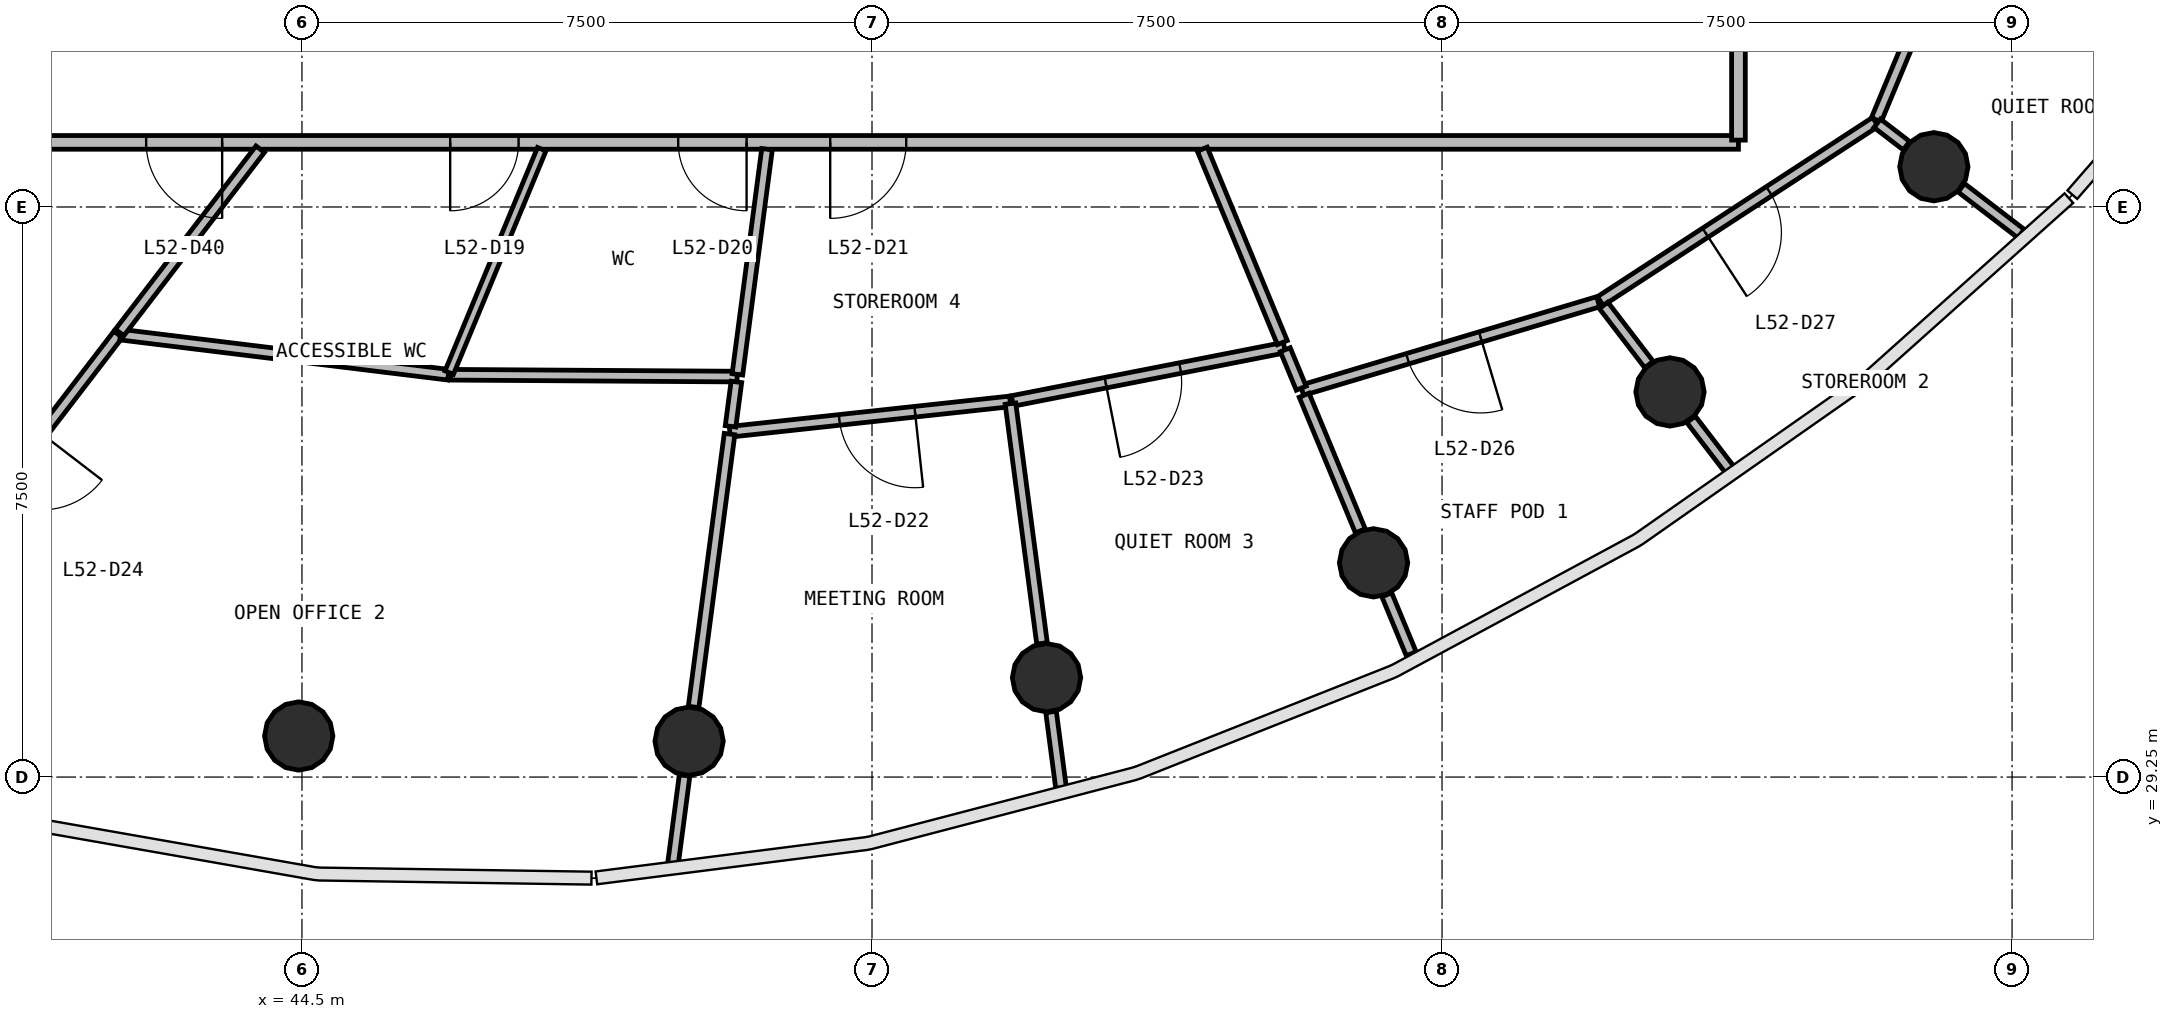
"""IFC4 building model, lengths in metres.
Left out: names, types, materials, properties, quantities, classifications, styles, units other than length and angle.
Written with IfcOpenShell. Run it as: python <this file> out.ifc"""

import sys

from ifc_helpers import new_model, si_unit, direction, frame, frame_2d, origin, origin_2d, place, context, subcontext, project, spatial, rectangle, circle, extrude, source, transform, mapped, element, fill, save


model = new_model("IFC4")
c1 = context("Model", 3, precision=1e-05, world=origin(), true_north=direction((0.0, 1.0)))
c2 = subcontext(c1, "Body", "Model", "MODEL_VIEW")
j1 = project(units=[si_unit("LENGTHUNIT", "METRE"), si_unit("PLANEANGLEUNIT", "RADIAN")], contexts=[c1])
p1 = place(None, origin())
s1 = spatial("IfcSite", under=j1, at=p1, CompositionType="ELEMENT")
p2 = place(p1, origin())
s2 = spatial("IfcBuilding", under=s1, at=p2, CompositionType="ELEMENT")
p3 = place(p2, frame((0.0, 0.0, 215.0)))
s3 = spatial("IfcBuildingStorey", under=s2, at=p3, CompositionType="ELEMENT", Elevation=215.0)
m1 = source(origin(), c2, "Body", "SweptSolid", [
    extrude(circle(Radius=0.45, at=origin_2d()), origin(), (0.0, 0.0, 1.0), 3.9),
])
for number, where, z_axis, x_axis in (
    (1, (44.457, 29.79, 0.0), (0.0, 0.0, 1.0), (1.0, 0.0, 0.0)),
    (2, (49.594, 29.722, 0.0), (0.0, 0.0, 1.0), (1.0, 0.0, 0.0)),
    (3, (54.296, 30.558, 0.0), (0.0, 0.0, 1.0), (1.0, 0.0, 0.0)),
    (4, (58.599, 32.069, 0.0), (0.0, 0.0, 1.0), (1.0, 0.0, 0.0)),
    (5, (62.499, 34.317, 0.0), (0.0, 0.0, 1.0), (1.0, 0.0, 0.0)),
    (6, (65.971, 37.28, 0.0), (0.0, 0.0, 1.0), (1.0, 0.0, 0.0)),
):
    element("IfcColumn", number, at=place(p3, frame(where, z_axis=z_axis, x_axis=x_axis)), inside=s3, PredefinedType="COLUMN", context=c2, shape_type="MappedRepresentation", body=[
        mapped(m1, transform((0.0, 0.0, 0.0), scale=1.0)),
    ])
p4 = place(p3, frame((63.4, 37.6, 0.0), z_axis=(0.0, 0.0, 1.0), x_axis=(-1.0, 0.0, 0.0)))
e7 = element("IfcWall", 7, at=p4, inside=s3, PredefinedType="PARTITIONING", context=c2, shape_type="SweptSolid", body=[
    extrude(rectangle(XDim=22.8, YDim=0.18, at=frame_2d((11.4, 0.0))), origin(), (0.0, 0.0, 1.0), 2.88),
])
p5 = place(p4, frame((16.05, 0.0, 0.0)))
e8 = element("IfcOpeningElement", 8, at=p5, cuts=e7, PredefinedType="OPENING", context=c2, shape_type="SweptSolid", body=[
    extrude(rectangle(XDim=0.9, YDim=2.1, at=frame_2d((0.45, 1.05))), frame((0.0, 0.1, 0.0), z_axis=(0.0, -1.0, 0.0), x_axis=(1.0, 0.0, 0.0)), (0.0, 0.0, 1.0), 0.2),
])
p6 = place(p4, frame((13.05, 0.0, 0.0)))
e9 = element("IfcOpeningElement", 9, at=p6, cuts=e7, PredefinedType="OPENING", context=c2, shape_type="SweptSolid", body=[
    extrude(rectangle(XDim=0.9, YDim=2.1, at=frame_2d((0.45, 1.05))), frame((0.0, 0.1, 0.0), z_axis=(0.0, -1.0, 0.0), x_axis=(1.0, 0.0, 0.0)), (0.0, 0.0, 1.0), 0.2),
])
p7 = place(p4, frame((10.95, 0.0, 0.0)))
e10 = element("IfcOpeningElement", 10, at=p7, cuts=e7, PredefinedType="OPENING", context=c2, shape_type="SweptSolid", body=[
    extrude(rectangle(XDim=1.0, YDim=2.1, at=frame_2d((0.5, 1.05))), frame((0.0, 0.1, 0.0), z_axis=(0.0, -1.0, 0.0), x_axis=(1.0, 0.0, 0.0)), (0.0, 0.0, 1.0), 0.2),
])
p8 = place(p4, frame((19.95, 0.0, 0.0)))
e11 = element("IfcOpeningElement", 11, at=p8, cuts=e7, PredefinedType="OPENING", context=c2, shape_type="SweptSolid", body=[
    extrude(rectangle(XDim=1.0, YDim=2.1, at=frame_2d((0.5, 1.05))), frame((0.0, 0.1, 0.0), z_axis=(0.0, -1.0, 0.0), x_axis=(1.0, 0.0, 0.0)), (0.0, 0.0, 1.0), 0.2),
])
p9 = place(p3, frame((63.4, 58.37, 0.0), z_axis=(0.0, 0.0, 1.0), x_axis=(0.0, -1.0, 0.0)))
e12 = element("IfcWall", 12, at=p9, inside=s3, PredefinedType="PARTITIONING", context=c2, shape_type="SweptSolid", body=[
    extrude(rectangle(XDim=20.74, YDim=0.18, at=frame_2d((10.37, 0.0))), origin(), (0.0, 0.0, 1.0), 2.88),
])
p10 = place(p9, frame((12.09, 0.0, 0.0)))
e13 = element("IfcOpeningElement", 13, at=p10, cuts=e12, PredefinedType="OPENING", context=c2, shape_type="SweptSolid", body=[
    extrude(rectangle(XDim=1.0, YDim=2.1, at=frame_2d((0.5, 1.05))), frame((0.0, 0.1, 0.0), z_axis=(0.0, -1.0, 0.0), x_axis=(1.0, 0.0, 0.0)), (0.0, 0.0, 1.0), 0.2),
])
p11 = place(p9, frame((9.89, 0.0, 0.0)))
e14 = element("IfcOpeningElement", 14, at=p11, cuts=e12, PredefinedType="OPENING", context=c2, shape_type="SweptSolid", body=[
    extrude(rectangle(XDim=1.0, YDim=2.1, at=frame_2d((0.5, 1.05))), frame((0.0, 0.1, 0.0), z_axis=(0.0, -1.0, 0.0), x_axis=(1.0, 0.0, 0.0)), (0.0, 0.0, 1.0), 0.2),
])
p12 = place(p9, frame((4.29, 0.0, 0.0)))
e15 = element("IfcOpeningElement", 15, at=p12, cuts=e12, PredefinedType="OPENING", context=c2, shape_type="SweptSolid", body=[
    extrude(rectangle(XDim=1.0, YDim=2.1, at=frame_2d((0.5, 1.05))), frame((0.0, 0.1, 0.0), z_axis=(0.0, -1.0, 0.0), x_axis=(1.0, 0.0, 0.0)), (0.0, 0.0, 1.0), 0.2),
])
p13 = place(p3, frame((42.082, 35.074, 0.0), z_axis=(0.0, 0.0, 1.0), x_axis=(-0.608752257704, -0.793360377596, 0.0)))
e16 = element("IfcWall", 16, at=p13, inside=s3, PredefinedType="PARTITIONING", context=c2, shape_type="SweptSolid", body=[
    extrude(rectangle(XDim=4.458, YDim=0.14, at=frame_2d((2.229, 0.0))), origin(), (0.0, 0.0, 1.0), 2.88),
])
p14 = place(p13, frame((1.65, 0.0, 0.0)))
e17 = element("IfcOpeningElement", 17, at=p14, cuts=e16, PredefinedType="OPENING", context=c2, shape_type="SweptSolid", body=[
    extrude(rectangle(XDim=1.0, YDim=2.1, at=frame_2d((0.5, 1.05))), frame((0.0, 0.08, 0.0), z_axis=(0.0, -1.0, 0.0), x_axis=(1.0, 0.0, 0.0)), (0.0, 0.0, 1.0), 0.16),
])
p15 = place(p3, frame((42.112, 35.071, 0.0), z_axis=(0.0, 0.0, 1.0), x_axis=(0.992606150854, -0.121379690584, 0.0)))
e18 = element("IfcWall", 18, at=p15, inside=s3, PredefinedType="PARTITIONING", context=c2, shape_type="SweptSolid", body=[
    extrude(rectangle(XDim=4.347, YDim=0.14, at=frame_2d((2.173, 0.0))), origin(), (0.0, 0.0, 1.0), 2.88),
])
p16 = place(p3, frame((65.202, 37.87, 0.0), z_axis=(0.0, 0.0, 1.0), x_axis=(-0.837855616801, -0.545891899001, 0.0)))
e19 = element("IfcWall", 19, at=p16, inside=s3, PredefinedType="PARTITIONING", context=c2, shape_type="SweptSolid", body=[
    extrude(rectangle(XDim=4.32, YDim=0.14, at=frame_2d((2.16, 0.0))), origin(), (0.0, 0.0, 1.0), 2.88),
])
p17 = place(p16, frame((1.67, 0.0, 0.0)))
e20 = element("IfcOpeningElement", 20, at=p17, cuts=e19, PredefinedType="OPENING", context=c2, shape_type="SweptSolid", body=[
    extrude(rectangle(XDim=1.0, YDim=2.1, at=frame_2d((0.5, 1.05))), frame((0.0, 0.08, 0.0), z_axis=(0.0, -1.0, 0.0), x_axis=(1.0, 0.0, 0.0)), (0.0, 0.0, 1.0), 0.16),
])
p18 = place(p3, frame((66.858, 41.845, 0.0), z_axis=(0.0, 0.0, 1.0), x_axis=(-0.384501893961, -0.923124202662, 0.0)))
e21 = element("IfcWall", 21, at=p18, inside=s3, PredefinedType="PARTITIONING", context=c2, shape_type="SweptSolid", body=[
    extrude(rectangle(XDim=4.277, YDim=0.14, at=frame_2d((2.139, 0.0))), origin(), (0.0, 0.0, 1.0), 2.88),
])
p19 = place(p18, frame((1.627, 0.0, 0.0)))
e22 = element("IfcOpeningElement", 22, at=p19, cuts=e21, PredefinedType="OPENING", context=c2, shape_type="SweptSolid", body=[
    extrude(rectangle(XDim=1.0, YDim=2.1, at=frame_2d((0.5, 1.05))), frame((0.0, 0.08, 0.0), z_axis=(0.0, -1.0, 0.0), x_axis=(1.0, 0.0, 0.0)), (0.0, 0.0, 1.0), 0.16),
])
p20 = place(p3, frame((61.554, 35.503, 0.0), z_axis=(0.0, 0.0, 1.0), x_axis=(-0.958115036861, -0.286383617097, 0.0)))
e23 = element("IfcWall", 23, at=p20, inside=s3, PredefinedType="PARTITIONING", context=c2, shape_type="SweptSolid", body=[
    extrude(rectangle(XDim=4.065, YDim=0.14, at=frame_2d((2.033, 0.0))), origin(), (0.0, 0.0, 1.0), 2.88),
])
p21 = place(p20, frame((1.615, 0.0, 0.0)))
e24 = element("IfcOpeningElement", 24, at=p21, cuts=e23, PredefinedType="OPENING", context=c2, shape_type="SweptSolid", body=[
    extrude(rectangle(XDim=1.0, YDim=2.1, at=frame_2d((0.5, 1.05))), frame((0.0, 0.08, 0.0), z_axis=(0.0, -1.0, 0.0), x_axis=(1.0, 0.0, 0.0)), (0.0, 0.0, 1.0), 0.16),
])
p22 = place(p3, frame((46.456, 34.543, 0.0), z_axis=(0.0, 0.0, 1.0), x_axis=(0.999979441631, -0.006412200578, 0.0)))
e25 = element("IfcWall", 25, at=p22, inside=s3, PredefinedType="PARTITIONING", context=c2, shape_type="SweptSolid", body=[
    extrude(rectangle(XDim=3.769, YDim=0.14, at=frame_2d((1.885, 0.0))), origin(), (0.0, 0.0, 1.0), 2.88),
])
p23 = place(p3, frame((53.818, 34.192, 0.0), z_axis=(0.0, 0.0, 1.0), x_axis=(-0.994173931983, -0.107787721776, 0.0)))
e26 = element("IfcWall", 26, at=p23, inside=s3, PredefinedType="PARTITIONING", context=c2, shape_type="SweptSolid", body=[
    extrude(rectangle(XDim=3.71, YDim=0.14, at=frame_2d((1.855, 0.0))), origin(), (0.0, 0.0, 1.0), 2.88),
])
p24 = place(p23, frame((1.26, 0.0, 0.0)))
e27 = element("IfcOpeningElement", 27, at=p24, cuts=e26, PredefinedType="OPENING", context=c2, shape_type="SweptSolid", body=[
    extrude(rectangle(XDim=1.0, YDim=2.1, at=frame_2d((0.5, 1.05))), frame((0.0, 0.08, 0.0), z_axis=(0.0, -1.0, 0.0), x_axis=(1.0, 0.0, 0.0)), (0.0, 0.0, 1.0), 0.16),
])
p25 = place(p3, frame((57.426, 34.9, 0.0), z_axis=(0.0, 0.0, 1.0), x_axis=(-0.981307553522, -0.192446058416, 0.0)))
e28 = element("IfcWall", 28, at=p25, inside=s3, PredefinedType="PARTITIONING", context=c2, shape_type="SweptSolid", body=[
    extrude(rectangle(XDim=3.647, YDim=0.14, at=frame_2d((1.824, 0.0))), origin(), (0.0, 0.0, 1.0), 2.88),
])
p26 = place(p25, frame((1.397, 0.0, 0.0)))
e29 = element("IfcOpeningElement", 29, at=p26, cuts=e28, PredefinedType="OPENING", context=c2, shape_type="SweptSolid", body=[
    extrude(rectangle(XDim=1.0, YDim=2.1, at=frame_2d((0.5, 1.05))), frame((0.0, 0.08, 0.0), z_axis=(0.0, -1.0, 0.0), x_axis=(1.0, 0.0, 0.0)), (0.0, 0.0, 1.0), 0.16),
])
p27 = place(p3, frame((50.125, 33.763, 0.0), z_axis=(0.0, 0.0, 1.0), x_axis=(-0.130520782699, -0.991445573536, 0.0)))
e30 = element("IfcWall", 30, at=p27, inside=s3, PredefinedType="PARTITIONING", context=c2, shape_type="SweptSolid", body=[
    extrude(rectangle(XDim=3.621, YDim=0.14, at=frame_2d((1.811, 0.0))), origin(), (0.0, 0.0, 1.0), 2.88),
])
p28 = place(p3, frame((53.822, 34.163, 0.0), z_axis=(0.0, 0.0, 1.0), x_axis=(0.130520013378, -0.991445674814, 0.0)))
e31 = element("IfcWall", 31, at=p28, inside=s3, PredefinedType="PARTITIONING", context=c2, shape_type="SweptSolid", body=[
    extrude(rectangle(XDim=3.182, YDim=0.14, at=frame_2d((1.591, 0.0))), origin(), (0.0, 0.0, 1.0), 2.88),
])
p29 = place(p3, frame((43.951, 37.51, 0.0), z_axis=(0.0, 0.0, 1.0), x_axis=(-0.608716498744, -0.793387814475, 0.0)))
e32 = element("IfcWall", 32, at=p29, inside=s3, PredefinedType="PARTITIONING", context=c2, shape_type="SweptSolid", body=[
    extrude(rectangle(XDim=3.039, YDim=0.14, at=frame_2d((1.52, 0.0))), origin(), (0.0, 0.0, 1.0), 2.88),
])
p30 = place(p3, frame((50.619, 37.51, 0.0), z_axis=(0.0, 0.0, 1.0), x_axis=(-0.130520050683, -0.991445669903, 0.0)))
e33 = element("IfcWall", 33, at=p30, inside=s3, PredefinedType="PARTITIONING", context=c2, shape_type="SweptSolid", body=[
    extrude(rectangle(XDim=2.987, YDim=0.14, at=frame_2d((1.494, 0.0))), origin(), (0.0, 0.0, 1.0), 2.88),
])
p31 = place(p3, frame((56.345, 37.51, 0.0), z_axis=(0.0, 0.0, 1.0), x_axis=(0.382675461762, -0.923882834003, 0.0)))
e34 = element("IfcWall", 34, at=p31, inside=s3, PredefinedType="PARTITIONING", context=c2, shape_type="SweptSolid", body=[
    extrude(rectangle(XDim=2.753, YDim=0.14, at=frame_2d((1.377, 0.0))), origin(), (0.0, 0.0, 1.0), 2.88),
])
p32 = place(p3, frame((57.686, 34.274, 0.0), z_axis=(0.0, 0.0, 1.0), x_axis=(0.382586213673, -0.92391979582, 0.0)))
e35 = element("IfcWall", 35, at=p32, inside=s3, PredefinedType="PARTITIONING", context=c2, shape_type="SweptSolid", body=[
    extrude(rectangle(XDim=1.932, YDim=0.14, at=frame_2d((0.966, 0.0))), origin(), (0.0, 0.0, 1.0), 2.88),
])
p33 = place(p3, frame((49.534, 29.271, 0.0), z_axis=(0.0, 0.0, 1.0), x_axis=(-0.130562588112, -0.991440069084, 0.0)))
e36 = element("IfcWall", 36, at=p33, inside=s3, PredefinedType="PARTITIONING", context=c2, shape_type="SweptSolid", body=[
    extrude(rectangle(XDim=1.169, YDim=0.14, at=frame_2d((0.584, 0.0))), origin(), (0.0, 0.0, 1.0), 2.88),
])
p34 = place(p3, frame((61.625, 35.456, 0.0), z_axis=(0.0, 0.0, 1.0), x_axis=(0.608724079915, -0.793381997862, 0.0)))
e37 = element("IfcWall", 37, at=p34, inside=s3, PredefinedType="PARTITIONING", context=c2, shape_type="SweptSolid", body=[
    extrude(rectangle(XDim=0.981, YDim=0.14, at=frame_2d((0.49, 0.0))), origin(), (0.0, 0.0, 1.0), 2.88),
])
p35 = place(p3, frame((54.356, 30.107, 0.0), z_axis=(0.0, 0.0, 1.0), x_axis=(0.130416888508, -0.991459245351, 0.0)))
e38 = element("IfcWall", 38, at=p35, inside=s3, PredefinedType="PARTITIONING", context=c2, shape_type="SweptSolid", body=[
    extrude(rectangle(XDim=1.007, YDim=0.14, at=frame_2d((0.503, 0.0))), origin(), (0.0, 0.0, 1.0), 2.88),
])
p36 = place(p3, frame((66.332, 37.003, 0.0), z_axis=(0.0, 0.0, 1.0), x_axis=(0.793419984166, -0.608674567176, 0.0)))
e39 = element("IfcWall", 39, at=p36, inside=s3, PredefinedType="PARTITIONING", context=c2, shape_type="SweptSolid", body=[
    extrude(rectangle(XDim=0.991, YDim=0.14, at=frame_2d((0.496, 0.0))), origin(), (0.0, 0.0, 1.0), 2.88),
])
p37 = place(p3, frame((58.773, 31.648, 0.0), z_axis=(0.0, 0.0, 1.0), x_axis=(0.382488701461, -0.923960168651, 0.0)))
e40 = element("IfcWall", 40, at=p37, inside=s3, PredefinedType="PARTITIONING", context=c2, shape_type="SweptSolid", body=[
    extrude(rectangle(XDim=0.84, YDim=0.14, at=frame_2d((0.42, 0.0))), origin(), (0.0, 0.0, 1.0), 2.88),
])
p38 = place(p3, frame((62.776, 33.956, 0.0), z_axis=(0.0, 0.0, 1.0), x_axis=(0.609006416532, -0.793165294641, 0.0)))
e41 = element("IfcWall", 41, at=p38, inside=s3, PredefinedType="PARTITIONING", context=c2, shape_type="SweptSolid", body=[
    extrude(rectangle(XDim=0.838, YDim=0.14, at=frame_2d((0.419, 0.0))), origin(), (0.0, 0.0, 1.0), 2.88),
])
p39 = place(p3, frame((50.216, 34.449, 0.0), z_axis=(0.0, 0.0, 1.0), x_axis=(-0.130400969459, -0.991461339218, 0.0)))
e42 = element("IfcWall", 42, at=p39, inside=s3, PredefinedType="PARTITIONING", context=c2, shape_type="SweptSolid", body=[
    extrude(rectangle(XDim=0.59, YDim=0.14, at=frame_2d((0.295, 0.0))), origin(), (0.0, 0.0, 1.0), 2.88),
])
p40 = place(p3, frame((57.438, 34.872, 0.0), z_axis=(0.0, 0.0, 1.0), x_axis=(0.382430528233, -0.923984248283, 0.0)))
e43 = element("IfcWall", 43, at=p40, inside=s3, PredefinedType="PARTITIONING", context=c2, shape_type="SweptSolid", body=[
    extrude(rectangle(XDim=0.548, YDim=0.14, at=frame_2d((0.274, 0.0))), origin(), (0.0, 0.0, 1.0), 2.88),
])
p41 = place(p3, frame((65.226, 37.851, 0.0), z_axis=(0.0, 0.0, 1.0), x_axis=(0.793298003937, -0.608833537964, 0.0)))
e44 = element("IfcWall", 44, at=p41, inside=s3, PredefinedType="PARTITIONING", context=c2, shape_type="SweptSolid", body=[
    extrude(rectangle(XDim=0.484, YDim=0.14, at=frame_2d((0.242, 0.0))), origin(), (0.0, 0.0, 1.0), 2.88),
])
p42 = place(p3, frame((47.655, 37.51, 0.0), z_axis=(0.0, 0.0, 1.0), x_axis=(-0.382636460762, -0.923898987387, 0.0)))
e45 = element("IfcWall", 45, at=p42, inside=s3, PredefinedType="PARTITIONING", context=c2, shape_type="SweptSolid", body=[
    extrude(rectangle(XDim=3.181, YDim=0.12, at=frame_2d((1.591, 0.0))), origin(), (0.0, 0.0, 1.0), 2.88),
])
m2 = source(origin(), c2, "Body", "SweptSolid", [
    extrude(rectangle(XDim=0.9, YDim=2.1, at=frame_2d((0.45, 1.05))), frame((0.0, 0.025, 0.0), z_axis=(0.0, -1.0, 0.0), x_axis=(1.0, 0.0, 0.0)), (0.0, 0.0, 1.0), 0.05),
])
p43 = place(p5, origin())
e46 = element("IfcDoor", 46, at=p43, inside=s3, OperationType="SINGLE_SWING_RIGHT", PredefinedType="DOOR", context=c2, shape_type="MappedRepresentation", body=[
    mapped(m2, transform((0.0, 0.0, 0.0), scale=1.0)),
])
fill(e8, e46)
p44 = place(p6, origin())
e47 = element("IfcDoor", 47, at=p44, inside=s3, OperationType="SINGLE_SWING_LEFT", PredefinedType="DOOR", context=c2, shape_type="MappedRepresentation", body=[
    mapped(m2, transform((0.0, 0.0, 0.0), scale=1.0)),
])
fill(e9, e47)
m3 = source(origin(), c2, "Body", "SweptSolid", [
    extrude(rectangle(XDim=1.0, YDim=2.1, at=frame_2d((0.5, 1.05))), frame((0.0, 0.025, 0.0), z_axis=(0.0, -1.0, 0.0), x_axis=(1.0, 0.0, 0.0)), (0.0, 0.0, 1.0), 0.05),
])
p45 = place(p7, origin())
e48 = element("IfcDoor", 48, at=p45, inside=s3, OperationType="SINGLE_SWING_RIGHT", PredefinedType="DOOR", context=c2, shape_type="MappedRepresentation", body=[
    mapped(m3, transform((0.0, 0.0, 0.0), scale=1.0)),
])
fill(e10, e48)
p46 = place(p24, origin())
e49 = element("IfcDoor", 49, at=p46, inside=s3, OperationType="SINGLE_SWING_LEFT", PredefinedType="DOOR", context=c2, shape_type="MappedRepresentation", body=[
    mapped(m3, transform((0.0, 0.0, 0.0), scale=1.0)),
])
fill(e27, e49)
p47 = place(p26, origin())
e50 = element("IfcDoor", 50, at=p47, inside=s3, OperationType="SINGLE_SWING_RIGHT", PredefinedType="DOOR", context=c2, shape_type="MappedRepresentation", body=[
    mapped(m3, transform((0.0, 0.0, 0.0), scale=1.0)),
])
fill(e29, e50)
p48 = place(p21, origin())
e51 = element("IfcDoor", 51, at=p48, inside=s3, OperationType="SINGLE_SWING_LEFT", PredefinedType="DOOR", context=c2, shape_type="MappedRepresentation", body=[
    mapped(m3, transform((0.0, 0.0, 0.0), scale=1.0)),
])
fill(e24, e51)
p49 = place(p17, origin())
e52 = element("IfcDoor", 52, at=p49, inside=s3, OperationType="SINGLE_SWING_RIGHT", PredefinedType="DOOR", context=c2, shape_type="MappedRepresentation", body=[
    mapped(m3, transform((0.0, 0.0, 0.0), scale=1.0)),
])
fill(e20, e52)
p50 = place(p8, origin())
e53 = element("IfcDoor", 53, at=p50, inside=s3, OperationType="SINGLE_SWING_LEFT", PredefinedType="DOOR", context=c2, shape_type="MappedRepresentation", body=[
    mapped(m3, transform((0.0, 0.0, 0.0), scale=1.0)),
])
fill(e11, e53)
save(model, sys.argv[1])
